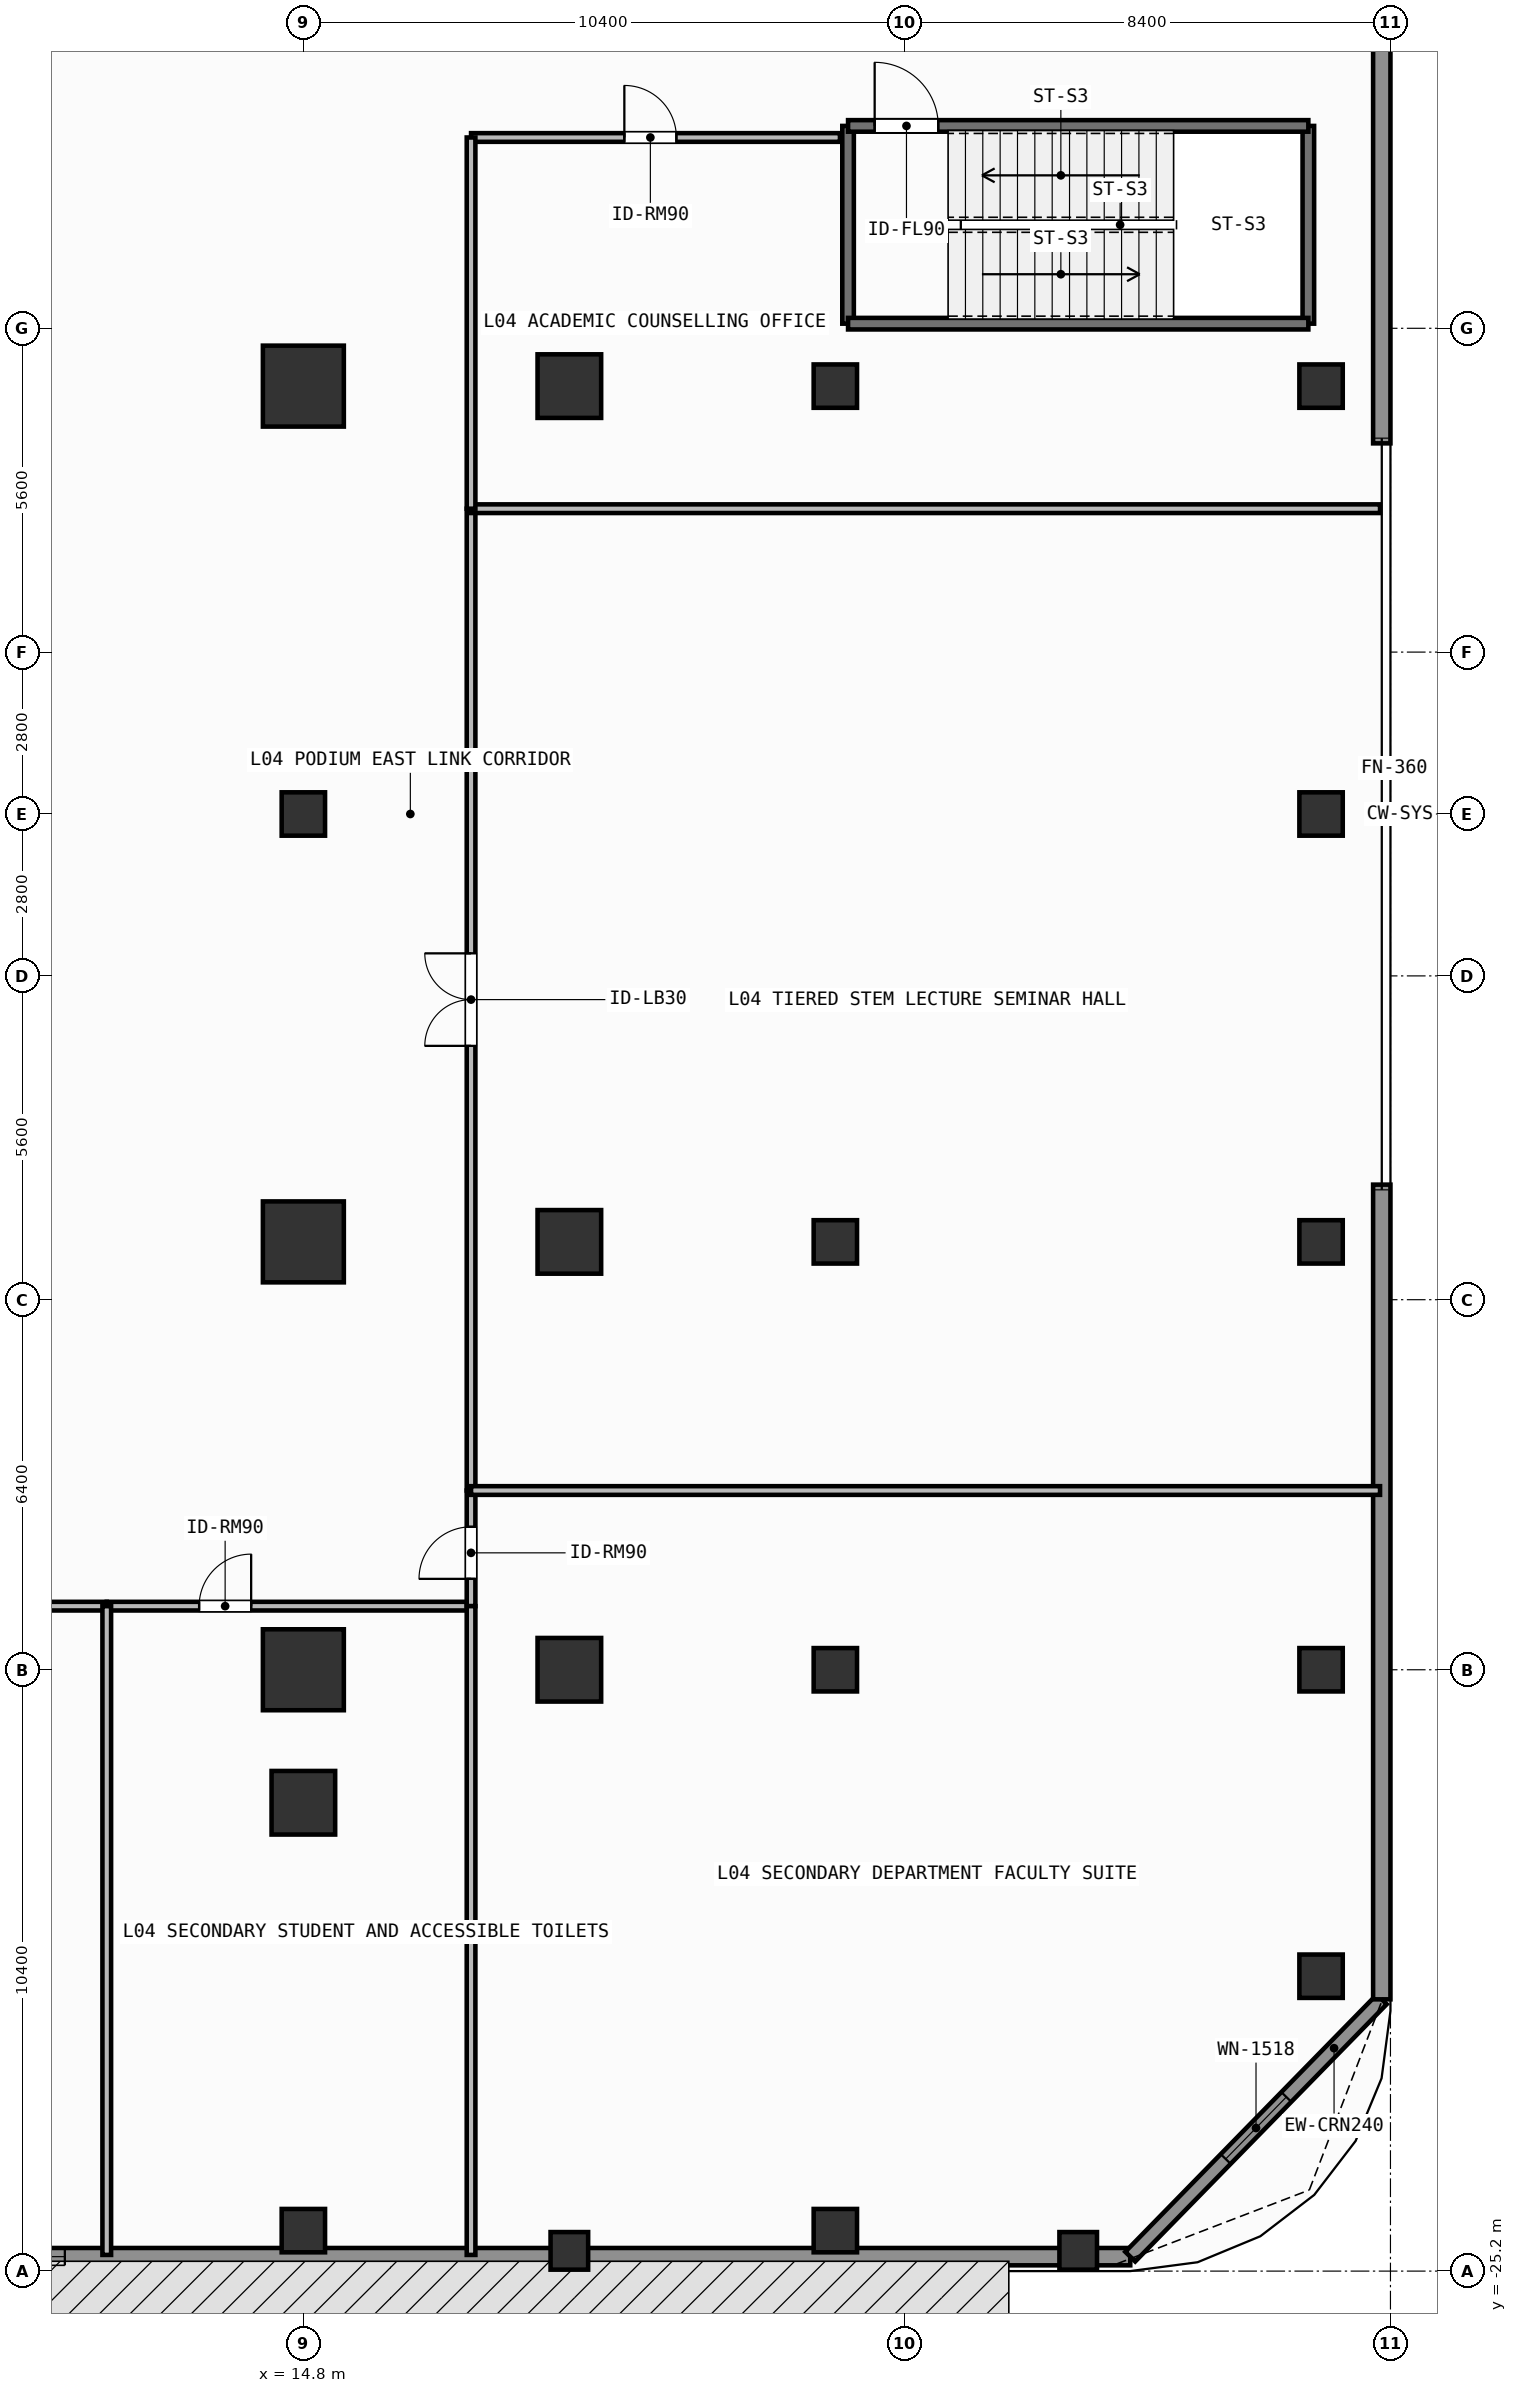
"""IFC4 building model, lengths in metres.
Left out: names, types, materials, properties, quantities, classifications, styles, units other than length and angle.
Written with IfcOpenShell. Run it as: python <this file> out.ifc"""

import sys

from ifc_helpers import new_model, si_unit, direction, frame, frame_2d, origin, origin_2d, place, context, subcontext, project, spatial, rectangle, extrude, element, fill, save


model = new_model("IFC4")
c1 = context("Model", 3, precision=1e-05, world=origin(), true_north=direction((0.0, 1.0)))
c2 = subcontext(c1, "Body", "Model", "MODEL_VIEW")
j1 = project(units=[si_unit("LENGTHUNIT", "METRE"), si_unit("PLANEANGLEUNIT", "RADIAN")], contexts=[c1])
p1 = place(None, origin())
s1 = spatial("IfcSite", under=j1, at=p1, CompositionType="ELEMENT")
p2 = place(p1, origin())
s2 = spatial("IfcBuilding", under=s1, at=p2, CompositionType="ELEMENT")
p3 = place(p2, frame((0.0, 0.0, 13.2)))
s3 = spatial("IfcBuildingStorey", under=s2, at=p3, CompositionType="ELEMENT", Elevation=13.2)
for number, where, z_axis, x_axis in (
    (1, (14.8, -14.8, 0.0), (0.0, 0.0, 1.0), (1.0, 0.0, 0.0)),
    (2, (14.8, -7.4, 0.0), (0.0, 0.0, 1.0), (1.0, 0.0, 0.0)),
    (3, (14.8, 7.4, 0.0), (0.0, 0.0, 1.0), (1.0, 0.0, 0.0)),
):
    element("IfcColumn", number, at=place(p3, frame(where, z_axis=z_axis, x_axis=x_axis)), inside=s3, PredefinedType="COLUMN", context=c2, shape_type="SweptSolid", body=[
        extrude(rectangle(XDim=1.4, YDim=1.4, at=origin_2d()), origin(), (0.0, 0.0, 1.0), 4.2),
    ])
for number, where, z_axis, x_axis in (
    (4, (19.4, -14.8, 0.0), (0.0, 0.0, 1.0), (1.0, 0.0, 0.0)),
    (5, (19.4, -7.4, 0.0), (0.0, 0.0, 1.0), (1.0, 0.0, 0.0)),
    (6, (19.4, 7.4, 0.0), (0.0, 0.0, 1.0), (1.0, 0.0, 0.0)),
    (7, (14.8, -17.1, 0.0), (0.0, 0.0, 1.0), (1.0, 0.0, 0.0)),
):
    element("IfcColumn", number, at=place(p3, frame(where, z_axis=z_axis, x_axis=x_axis)), inside=s3, PredefinedType="COLUMN", context=c2, shape_type="SweptSolid", body=[
        extrude(rectangle(XDim=1.1, YDim=1.1, at=origin_2d()), origin(), (0.0, 0.0, 1.0), 4.2),
    ])
for number, where, z_axis, x_axis in (
    (8, (14.8, -24.5, 0.0), (0.0, 0.0, 1.0), (1.0, 0.0, 0.0)),
    (9, (14.8, 0.0, 0.0), (0.0, 0.0, 1.0), (1.0, 0.0, 0.0)),
    (10, (24.0, -24.5, 0.0), (0.0, 0.0, 1.0), (1.0, 0.0, 0.0)),
    (11, (24.0, -14.8, 0.0), (0.0, 0.0, 1.0), (1.0, 0.0, 0.0)),
    (12, (24.0, -7.4, 0.0), (0.0, 0.0, 1.0), (1.0, 0.0, 0.0)),
    (13, (24.0, 7.4, 0.0), (0.0, 0.0, 1.0), (1.0, 0.0, 0.0)),
    (14, (32.4, -14.8, 0.0), (0.0, 0.0, 1.0), (1.0, 0.0, 0.0)),
    (15, (32.4, -7.4, 0.0), (0.0, 0.0, 1.0), (1.0, 0.0, 0.0)),
    (16, (32.4, 0.0, 0.0), (0.0, 0.0, 1.0), (1.0, 0.0, 0.0)),
    (17, (32.4, 7.4, 0.0), (0.0, 0.0, 1.0), (1.0, 0.0, 0.0)),
    (18, (32.4, -20.1, 0.0), (0.0, 0.0, 1.0), (1.0, 0.0, 0.0)),
):
    element("IfcColumn", number, at=place(p3, frame(where, z_axis=z_axis, x_axis=x_axis)), inside=s3, PredefinedType="COLUMN", context=c2, shape_type="SweptSolid", body=[
        extrude(rectangle(XDim=0.75, YDim=0.75, at=origin_2d()), origin(), (0.0, 0.0, 1.0), 4.2),
    ])
for number, where, z_axis, x_axis in (
    (19, (19.4, -24.85, 0.0), (0.0, 0.0, 1.0), (1.0, 0.0, 0.0)),
    (20, (28.2, -24.85, 0.0), (0.0, 0.0, 1.0), (1.0, 0.0, 0.0)),
):
    element("IfcColumn", number, at=place(p3, frame(where, z_axis=z_axis, x_axis=x_axis)), inside=s3, PredefinedType="PILASTER", context=c2, shape_type="SweptSolid", body=[
        extrude(rectangle(XDim=0.65, YDim=0.65, at=origin_2d()), origin(), (0.0, 0.0, 1.0), 4.2),
    ])
p4 = place(p3, frame((29.1, -24.95, 0.0), z_axis=(0.0, 0.0, 1.0), x_axis=(-1.0, 0.0, 0.0)))
e21 = element("IfcWall", 21, at=p4, inside=s3, PredefinedType="SOLIDWALL", context=c2, shape_type="SweptSolid", body=[
    extrude(rectangle(XDim=58.2, YDim=0.3, at=frame_2d((29.1, 0.0))), origin(), (0.0, 0.0, 1.0), 3.96),
])
p5 = place(p4, frame((39.825, 0.0, 0.85)))
e22 = element("IfcOpeningElement", 22, at=p5, cuts=e21, PredefinedType="OPENING", context=c2, shape_type="SweptSolid", body=[
    extrude(rectangle(XDim=2.1, YDim=2.2, at=frame_2d((1.05, 1.1))), frame((0.0, 0.16, 0.0), z_axis=(0.0, -1.0, 0.0), x_axis=(1.0, 0.0, 0.0)), (0.0, 0.0, 1.0), 0.32),
])
p6 = place(p4, frame((31.75, 0.0, 0.85)))
e23 = element("IfcOpeningElement", 23, at=p6, cuts=e21, PredefinedType="OPENING", context=c2, shape_type="SweptSolid", body=[
    extrude(rectangle(XDim=2.1, YDim=2.2, at=frame_2d((1.05, 1.1))), frame((0.0, 0.16, 0.0), z_axis=(0.0, -1.0, 0.0), x_axis=(1.0, 0.0, 0.0)), (0.0, 0.0, 1.0), 0.32),
])
p7 = place(p4, frame((24.35, 0.0, 0.85)))
e24 = element("IfcOpeningElement", 24, at=p7, cuts=e21, PredefinedType="OPENING", context=c2, shape_type="SweptSolid", body=[
    extrude(rectangle(XDim=2.1, YDim=2.2, at=frame_2d((1.05, 1.1))), frame((0.0, 0.16, 0.0), z_axis=(0.0, -1.0, 0.0), x_axis=(1.0, 0.0, 0.0)), (0.0, 0.0, 1.0), 0.32),
])
p8 = place(p4, frame((18.425, 0.0, 0.85)))
e25 = element("IfcOpeningElement", 25, at=p8, cuts=e21, PredefinedType="OPENING", context=c2, shape_type="SweptSolid", body=[
    extrude(rectangle(XDim=2.1, YDim=2.2, at=frame_2d((1.05, 1.1))), frame((0.0, 0.16, 0.0), z_axis=(0.0, -1.0, 0.0), x_axis=(1.0, 0.0, 0.0)), (0.0, 0.0, 1.0), 0.32),
])
p9 = place(p3, frame((33.45, -20.5, 0.0), z_axis=(0.0, 0.0, 1.0), x_axis=(-0.69901822973, -0.715103848756, 0.0)))
e26 = element("IfcWall", 26, at=p9, inside=s3, PredefinedType="SOLIDWALL", context=c2, shape_type="SweptSolid", body=[
    extrude(rectangle(XDim=6.223, YDim=0.24, at=frame_2d((3.111, 0.0))), origin(), (0.0, 0.0, 1.0), 3.96),
])
p10 = place(p9, frame((2.362, 0.0, 0.85)))
e27 = element("IfcOpeningElement", 27, at=p10, cuts=e26, PredefinedType="OPENING", context=c2, shape_type="SweptSolid", body=[
    extrude(rectangle(XDim=1.5, YDim=1.85, at=frame_2d((0.75, 0.925))), frame((0.0, 0.13, 0.0), z_axis=(0.0, -1.0, 0.0), x_axis=(1.0, 0.0, 0.0)), (0.0, 0.0, 1.0), 0.26),
])
for number, where, z_axis, x_axis in (
    (28, (33.45, -20.5, 0.0), (0.0, 0.0, 1.0), (0.0, 1.0, 0.0)),
    (29, (33.45, 6.41, 0.0), (0.0, 0.0, 1.0), (0.0, 1.0, 0.0)),
):
    element("IfcWall", number, at=place(p3, frame(where, z_axis=z_axis, x_axis=x_axis)), inside=s3, PredefinedType="SOLIDWALL", context=c2, shape_type="SweptSolid", body=[
        extrude(rectangle(XDim=14.09, YDim=0.3, at=frame_2d((7.045, 0.0))), origin(), (0.0, 0.0, 1.0), 3.96),
    ])
for number, where, z_axis, x_axis in (
    (30, (24.22, 8.48, 0.0), (0.0, 0.0, 1.0), (0.0, 1.0, 0.0)),
    (31, (32.18, 11.9, 0.0), (0.0, 0.0, 1.0), (0.0, -1.0, 0.0)),
):
    element("IfcWall", number, at=place(p3, frame(where, z_axis=z_axis, x_axis=x_axis)), inside=s3, PredefinedType="SHEAR", context=c2, shape_type="SweptSolid", body=[
        extrude(rectangle(XDim=3.42, YDim=0.2, at=frame_2d((1.71, 0.0))), origin(), (0.0, 0.0, 1.0), 3.96),
    ])
p11 = place(p3, frame((32.18, 8.48, 0.0), z_axis=(0.0, 0.0, 1.0), x_axis=(-1.0, 0.0, 0.0)))
e32 = element("IfcWall", 32, at=p11, inside=s3, PredefinedType="SHEAR", context=c2, shape_type="SweptSolid", body=[
    extrude(rectangle(XDim=7.96, YDim=0.2, at=frame_2d((3.98, 0.0))), origin(), (0.0, 0.0, 1.0), 3.96),
])
p12 = place(p3, frame((24.22, 11.9, 0.0), z_axis=(0.0, 0.0, 1.0), x_axis=(1.0, 0.0, 0.0)))
e33 = element("IfcWall", 33, at=p12, inside=s3, PredefinedType="SHEAR", context=c2, shape_type="SweptSolid", body=[
    extrude(rectangle(XDim=7.96, YDim=0.2, at=frame_2d((3.98, 0.0))), origin(), (0.0, 0.0, 1.0), 3.96),
])
p13 = place(p12, frame((0.46, 0.0, 0.0)))
e34 = element("IfcOpeningElement", 34, at=p13, cuts=e33, PredefinedType="OPENING", context=c2, shape_type="SweptSolid", body=[
    extrude(rectangle(XDim=1.1, YDim=2.15, at=frame_2d((0.55, 1.075))), frame((0.0, 0.11, 0.0), z_axis=(0.0, -1.0, 0.0), x_axis=(1.0, 0.0, 0.0)), (0.0, 0.0, 1.0), 0.22),
])
p14 = place(p3, frame((17.7, 11.7, 0.0), z_axis=(0.0, 0.0, 1.0), x_axis=(1.0, 0.0, 0.0)))
e35 = element("IfcWall", 35, at=p14, inside=s3, PredefinedType="PARTITIONING", context=c2, shape_type="SweptSolid", body=[
    extrude(rectangle(XDim=6.38, YDim=0.15, at=frame_2d((3.19, 0.0))), origin(), (0.0, 0.0, 1.0), 3.96),
])
p15 = place(p14, frame((2.651, 0.0, 0.0)))
e36 = element("IfcOpeningElement", 36, at=p15, cuts=e35, PredefinedType="OPENING", context=c2, shape_type="SweptSolid", body=[
    extrude(rectangle(XDim=0.9, YDim=2.1, at=frame_2d((0.45, 1.05))), frame((0.0, 0.085, 0.0), z_axis=(0.0, -1.0, 0.0), x_axis=(1.0, 0.0, 0.0)), (0.0, 0.0, 1.0), 0.17),
])
p16 = place(p3, frame((17.7, -11.7, 0.0), z_axis=(0.0, 0.0, 1.0), x_axis=(0.0, 1.0, 0.0)))
e37 = element("IfcWall", 37, at=p16, inside=s3, PredefinedType="PARTITIONING", context=c2, shape_type="SweptSolid", body=[
    extrude(rectangle(XDim=16.98, YDim=0.15, at=frame_2d((8.49, 0.0))), origin(), (0.0, 0.0, 1.0), 3.96),
])
p17 = place(p16, frame((7.69, 0.0, 0.0)))
e38 = element("IfcOpeningElement", 38, at=p17, cuts=e37, PredefinedType="OPENING", context=c2, shape_type="SweptSolid", body=[
    extrude(rectangle(XDim=1.6, YDim=2.3, at=frame_2d((0.8, 1.15))), frame((0.0, 0.085, 0.0), z_axis=(0.0, -1.0, 0.0), x_axis=(1.0, 0.0, 0.0)), (0.0, 0.0, 1.0), 0.17),
])
p18 = place(p3, frame((-9.2, -13.7, 0.0), z_axis=(0.0, 0.0, 1.0), x_axis=(1.0, 0.0, 0.0)))
e39 = element("IfcWall", 39, at=p18, inside=s3, PredefinedType="PARTITIONING", context=c2, shape_type="SweptSolid", body=[
    extrude(rectangle(XDim=20.6, YDim=0.15, at=frame_2d((10.3, 0.0))), origin(), (0.0, 0.0, 1.0), 3.96),
])
p19 = place(p18, frame((10.029, 0.0, 0.0)))
e40 = element("IfcOpeningElement", 40, at=p19, cuts=e39, PredefinedType="OPENING", context=c2, shape_type="SweptSolid", body=[
    extrude(rectangle(XDim=0.9, YDim=2.1, at=frame_2d((0.45, 1.05))), frame((0.0, 0.085, 0.0), z_axis=(0.0, -1.0, 0.0), x_axis=(1.0, 0.0, 0.0)), (0.0, 0.0, 1.0), 0.17),
])
p20 = place(p3, frame((11.4, -13.7, 0.0), z_axis=(0.0, 0.0, 1.0), x_axis=(1.0, 0.0, 0.0)))
e41 = element("IfcWall", 41, at=p20, inside=s3, PredefinedType="PARTITIONING", context=c2, shape_type="SweptSolid", body=[
    extrude(rectangle(XDim=6.25, YDim=0.15, at=frame_2d((3.125, 0.0))), origin(), (0.0, 0.0, 1.0), 3.96),
])
p21 = place(p20, frame((1.597, 0.0, 0.0)))
e42 = element("IfcOpeningElement", 42, at=p21, cuts=e41, PredefinedType="OPENING", context=c2, shape_type="SweptSolid", body=[
    extrude(rectangle(XDim=0.9, YDim=2.1, at=frame_2d((0.45, 1.05))), frame((0.0, 0.085, 0.0), z_axis=(0.0, -1.0, 0.0), x_axis=(1.0, 0.0, 0.0)), (0.0, 0.0, 1.0), 0.17),
])
p22 = place(p3, frame((17.7, -13.7, 0.0), z_axis=(0.0, 0.0, 1.0), x_axis=(0.0, 1.0, 0.0)))
e43 = element("IfcWall", 43, at=p22, inside=s3, PredefinedType="PARTITIONING", context=c2, shape_type="SweptSolid", body=[
    extrude(rectangle(XDim=2.0, YDim=0.15, at=frame_2d((1.0, 0.0))), origin(), (0.0, 0.0, 1.0), 3.96),
])
p23 = place(p22, frame((0.472, 0.0, 0.0)))
e44 = element("IfcOpeningElement", 44, at=p23, cuts=e43, PredefinedType="OPENING", context=c2, shape_type="SweptSolid", body=[
    extrude(rectangle(XDim=0.9, YDim=2.1, at=frame_2d((0.45, 1.05))), frame((0.0, 0.085, 0.0), z_axis=(0.0, -1.0, 0.0), x_axis=(1.0, 0.0, 0.0)), (0.0, 0.0, 1.0), 0.17),
])
for number, where, z_axis, x_axis in (
    (45, (17.7, -11.7, 0.0), (0.0, 0.0, 1.0), (1.0, 0.0, 0.0)),
    (46, (17.7, 5.28, 0.0), (0.0, 0.0, 1.0), (1.0, 0.0, 0.0)),
):
    element("IfcWall", number, at=place(p3, frame(where, z_axis=z_axis, x_axis=x_axis)), inside=s3, PredefinedType="PARTITIONING", context=c2, shape_type="SweptSolid", body=[
        extrude(rectangle(XDim=15.72, YDim=0.15, at=frame_2d((7.86, 0.0))), origin(), (0.0, 0.0, 1.0), 3.96),
    ])
p24 = place(p3, frame((17.7, 5.28, 0.0), z_axis=(0.0, 0.0, 1.0), x_axis=(0.0, 1.0, 0.0)))
e47 = element("IfcWall", 47, at=p24, inside=s3, PredefinedType="PARTITIONING", context=c2, shape_type="SweptSolid", body=[
    extrude(rectangle(XDim=6.42, YDim=0.15, at=frame_2d((3.21, 0.0))), origin(), (0.0, 0.0, 1.0), 3.96),
])
for number, where, z_axis, x_axis in (
    (48, (11.4, -24.92, 0.0), (0.0, 0.0, 1.0), (0.0, 1.0, 0.0)),
    (49, (17.7, -24.92, 0.0), (0.0, 0.0, 1.0), (0.0, 1.0, 0.0)),
):
    element("IfcWall", number, at=place(p3, frame(where, z_axis=z_axis, x_axis=x_axis)), inside=s3, PredefinedType="PARTITIONING", context=c2, shape_type="SweptSolid", body=[
        extrude(rectangle(XDim=11.22, YDim=0.15, at=frame_2d((5.61, 0.0))), origin(), (0.0, 0.0, 1.0), 3.96),
    ])
p25 = place(p10, origin())
e50 = element("IfcWindow", 50, at=p25, inside=s3, PartitioningType="SINGLE_PANEL", PredefinedType="WINDOW", context=c2, shape_type="SweptSolid", body=[
    extrude(rectangle(XDim=1.5, YDim=1.85, at=frame_2d((0.75, 0.925))), frame((0.0, 0.03, 0.0), z_axis=(0.0, -1.0, 0.0), x_axis=(1.0, 0.0, 0.0)), (0.0, 0.0, 1.0), 0.06),
])
fill(e27, e50)
p26 = place(p8, origin())
e51 = element("IfcWindow", 51, at=p26, inside=s3, PartitioningType="SINGLE_PANEL", PredefinedType="WINDOW", context=c2, shape_type="SweptSolid", body=[
    extrude(rectangle(XDim=2.1, YDim=2.2, at=frame_2d((1.05, 1.1))), frame((0.0, 0.03, 0.0), z_axis=(0.0, -1.0, 0.0), x_axis=(1.0, 0.0, 0.0)), (0.0, 0.0, 1.0), 0.06),
])
fill(e25, e51)
p27 = place(p13, origin())
e52 = element("IfcDoor", 52, at=p27, inside=s3, OperationType="SINGLE_SWING_LEFT", PredefinedType="DOOR", context=c2, shape_type="SweptSolid", body=[
    extrude(rectangle(XDim=1.1, YDim=2.15, at=frame_2d((0.55, 1.075))), frame((0.0, 0.025, 0.0), z_axis=(0.0, -1.0, 0.0), x_axis=(1.0, 0.0, 0.0)), (0.0, 0.0, 1.0), 0.05),
])
fill(e34, e52)
p28 = place(p15, origin())
e53 = element("IfcDoor", 53, at=p28, inside=s3, OperationType="SINGLE_SWING_LEFT", PredefinedType="DOOR", context=c2, shape_type="SweptSolid", body=[
    extrude(rectangle(XDim=0.9, YDim=2.1, at=frame_2d((0.45, 1.05))), frame((0.0, 0.025, 0.0), z_axis=(0.0, -1.0, 0.0), x_axis=(1.0, 0.0, 0.0)), (0.0, 0.0, 1.0), 0.05),
])
fill(e36, e53)
p29 = place(p17, origin())
e54 = element("IfcDoor", 54, at=p29, inside=s3, OperationType="SINGLE_SWING_LEFT", PredefinedType="DOOR", context=c2, shape_type="SweptSolid", body=[
    extrude(rectangle(XDim=1.6, YDim=2.3, at=frame_2d((0.8, 1.15))), frame((0.0, 0.025, 0.0), z_axis=(0.0, -1.0, 0.0), x_axis=(1.0, 0.0, 0.0)), (0.0, 0.0, 1.0), 0.05),
])
fill(e38, e54)
p30 = place(p21, origin())
e55 = element("IfcDoor", 55, at=p30, inside=s3, OperationType="SINGLE_SWING_RIGHT", PredefinedType="DOOR", context=c2, shape_type="SweptSolid", body=[
    extrude(rectangle(XDim=0.9, YDim=2.1, at=frame_2d((0.45, 1.05))), frame((0.0, 0.025, 0.0), z_axis=(0.0, -1.0, 0.0), x_axis=(1.0, 0.0, 0.0)), (0.0, 0.0, 1.0), 0.05),
])
fill(e42, e55)
p31 = place(p23, origin())
e56 = element("IfcDoor", 56, at=p31, inside=s3, OperationType="SINGLE_SWING_LEFT", PredefinedType="DOOR", context=c2, shape_type="SweptSolid", body=[
    extrude(rectangle(XDim=0.9, YDim=2.1, at=frame_2d((0.45, 1.05))), frame((0.0, 0.025, 0.0), z_axis=(0.0, -1.0, 0.0), x_axis=(1.0, 0.0, 0.0)), (0.0, 0.0, 1.0), 0.05),
])
fill(e44, e56)
save(model, sys.argv[1])
